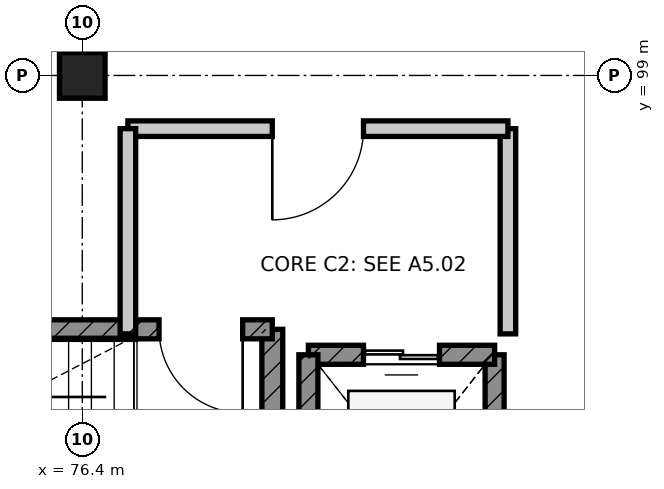
"""IFC4 building model, lengths in metres.
Left out: names, types, materials, properties, quantities, classifications, styles, units other than length and angle.
Written with IfcOpenShell. Run it as: python <this file> out.ifc"""

import sys

from ifc_helpers import new_model, si_unit, direction, frame, frame_2d, origin, origin_2d, place, context, subcontext, project, spatial, rectangle, extrude, element, fill, save


model = new_model("IFC4")
c1 = context("Model", 3, precision=1e-05, world=origin(), true_north=direction((0.0, 1.0)))
c2 = subcontext(c1, "Body", "Model", "MODEL_VIEW")
j1 = project(units=[si_unit("LENGTHUNIT", "METRE"), si_unit("PLANEANGLEUNIT", "RADIAN")], contexts=[c1])
p1 = place(None, origin())
s1 = spatial("IfcSite", under=j1, at=p1, CompositionType="ELEMENT")
p2 = place(p1, origin())
s2 = spatial("IfcBuilding", under=s1, at=p2, CompositionType="ELEMENT")
p3 = place(p2, frame((0.0, 0.0, 33.6)))
s3 = spatial("IfcBuildingStorey", under=s2, at=p3, CompositionType="ELEMENT", Elevation=33.6)
p4 = place(p3, frame((76.4, 99.0, 0.0), z_axis=(0.0, 0.0, 1.0), x_axis=(1.0, 0.0, 0.0)))
e1 = element("IfcColumn", 1, at=p4, inside=s3, PredefinedType="COLUMN", context=c2, shape_type="SweptSolid", body=[
    extrude(rectangle(XDim=0.6, YDim=0.6, at=origin_2d()), origin(), (0.0, 0.0, 1.0), 3.6),
])
p5 = place(p3, frame((78.9, 92.1, 0.0), z_axis=(0.0, 0.0, 1.0), x_axis=(0.0, 1.0, 0.0)))
e2 = element("IfcWall", 2, at=p5, inside=s3, PredefinedType="SHEAR", context=c2, shape_type="SweptSolid", body=[
    extrude(rectangle(XDim=3.56, YDim=0.275, at=frame_2d((1.78, 0.0))), origin(), (0.0, 0.0, 1.0), 3.36),
])
p6 = place(p3, frame((78.9, 95.66, 0.0), z_axis=(0.0, 0.0, 1.0), x_axis=(-1.0, 0.0, 0.0)))
e3 = element("IfcWall", 3, at=p6, inside=s3, PredefinedType="SHEAR", context=c2, shape_type="SweptSolid", body=[
    extrude(rectangle(XDim=8.4, YDim=0.25, at=frame_2d((4.2, 0.0))), origin(), (0.0, 0.0, 1.0), 3.36),
])
p7 = place(p6, frame((0.39, 0.0, 0.0)))
e4 = element("IfcOpeningElement", 4, at=p7, cuts=e3, PredefinedType="OPENING", context=c2, shape_type="SweptSolid", body=[
    extrude(rectangle(XDim=1.1, YDim=2.1, at=frame_2d((0.55, 1.05))), frame((0.0, 0.135, 0.0), z_axis=(0.0, -1.0, 0.0), x_axis=(1.0, 0.0, 0.0)), (0.0, 0.0, 1.0), 0.27),
])
p8 = place(p3, frame((81.825, 92.275, 0.0), z_axis=(0.0, 0.0, 1.0), x_axis=(0.0, 1.0, 0.0)))
e5 = element("IfcWall", 5, at=p8, inside=s3, PredefinedType="SHEAR", context=c2, shape_type="SweptSolid", body=[
    extrude(rectangle(XDim=3.05, YDim=0.25, at=frame_2d((1.525, 0.0))), origin(), (0.0, 0.0, 1.0), 3.36),
])
p9 = place(p3, frame((81.825, 95.325, 0.0), z_axis=(0.0, 0.0, 1.0), x_axis=(-1.0, 0.0, 0.0)))
e6 = element("IfcWall", 6, at=p9, inside=s3, PredefinedType="SHEAR", context=c2, shape_type="SweptSolid", body=[
    extrude(rectangle(XDim=2.45, YDim=0.25, at=frame_2d((1.225, 0.0))), origin(), (0.0, 0.0, 1.0), 3.36),
])
p10 = place(p9, frame((0.725, 0.0, 0.0)))
e7 = element("IfcOpeningElement", 7, at=p10, cuts=e6, PredefinedType="OPENING", context=c2, shape_type="SweptSolid", body=[
    extrude(rectangle(XDim=1.0, YDim=2.15, at=frame_2d((0.5, 1.075))), frame((0.0, 0.135, 0.0), z_axis=(0.0, -1.0, 0.0), x_axis=(1.0, 0.0, 0.0)), (0.0, 0.0, 1.0), 0.27),
])
p11 = place(p3, frame((79.375, 95.325, 0.0), z_axis=(0.0, 0.0, 1.0), x_axis=(0.0, -1.0, 0.0)))
e8 = element("IfcWall", 8, at=p11, inside=s3, PredefinedType="SHEAR", context=c2, shape_type="SweptSolid", body=[
    extrude(rectangle(XDim=3.05, YDim=0.25, at=frame_2d((1.525, 0.0))), origin(), (0.0, 0.0, 1.0), 3.36),
])
p12 = place(p3, frame((82.0, 95.6, 0.0), z_axis=(0.0, 0.0, 1.0), x_axis=(0.0, 1.0, 0.0)))
e9 = element("IfcWall", 9, at=p12, inside=s3, PredefinedType="PARTITIONING", context=c2, shape_type="SweptSolid", body=[
    extrude(rectangle(XDim=2.7, YDim=0.205, at=frame_2d((1.35, 0.0))), origin(), (0.0, 0.0, 1.0), 3.36),
])
p13 = place(p3, frame((82.0, 98.3, 0.0), z_axis=(0.0, 0.0, 1.0), x_axis=(-1.0, 0.0, 0.0)))
e10 = element("IfcWall", 10, at=p13, inside=s3, PredefinedType="PARTITIONING", context=c2, shape_type="SweptSolid", body=[
    extrude(rectangle(XDim=5.0, YDim=0.205, at=frame_2d((2.5, 0.0))), origin(), (0.0, 0.0, 1.0), 3.36),
])
p14 = place(p13, frame((1.9, 0.0, 0.0)))
e11 = element("IfcOpeningElement", 11, at=p14, cuts=e10, PredefinedType="OPENING", context=c2, shape_type="SweptSolid", body=[
    extrude(rectangle(XDim=1.2, YDim=2.1, at=frame_2d((0.6, 1.05))), frame((0.0, 0.113, 0.0), z_axis=(0.0, -1.0, 0.0), x_axis=(1.0, 0.0, 0.0)), (0.0, 0.0, 1.0), 0.225),
])
p15 = place(p3, frame((77.0, 98.3, 0.0), z_axis=(0.0, 0.0, 1.0), x_axis=(0.0, -1.0, 0.0)))
e12 = element("IfcWall", 12, at=p15, inside=s3, PredefinedType="PARTITIONING", context=c2, shape_type="SweptSolid", body=[
    extrude(rectangle(XDim=2.7, YDim=0.205, at=frame_2d((1.35, 0.0))), origin(), (0.0, 0.0, 1.0), 3.36),
])
p16 = place(p7, origin())
e13 = element("IfcDoor", 13, at=p16, inside=s3, OperationType="SINGLE_SWING_LEFT", PredefinedType="DOOR", context=c2, shape_type="SweptSolid", body=[
    extrude(rectangle(XDim=1.1, YDim=2.1, at=frame_2d((0.55, 1.05))), frame((0.0, 0.025, 0.0), z_axis=(0.0, -1.0, 0.0), x_axis=(1.0, 0.0, 0.0)), (0.0, 0.0, 1.0), 0.05),
])
fill(e4, e13)
p17 = place(p10, origin())
e14 = element("IfcDoor", 14, at=p17, inside=s3, OperationType="DOUBLE_DOOR_SLIDING", PredefinedType="DOOR", context=c2, shape_type="SweptSolid", body=[
    extrude(rectangle(XDim=1.0, YDim=2.15, at=frame_2d((0.5, 1.075))), frame((0.0, 0.025, 0.0), z_axis=(0.0, -1.0, 0.0), x_axis=(1.0, 0.0, 0.0)), (0.0, 0.0, 1.0), 0.05),
])
fill(e7, e14)
p18 = place(p14, origin())
e15 = element("IfcDoor", 15, at=p18, inside=s3, OperationType="SINGLE_SWING_RIGHT", PredefinedType="DOOR", context=c2, shape_type="SweptSolid", body=[
    extrude(rectangle(XDim=1.2, YDim=2.1, at=frame_2d((0.6, 1.05))), frame((0.0, 0.025, 0.0), z_axis=(0.0, -1.0, 0.0), x_axis=(1.0, 0.0, 0.0)), (0.0, 0.0, 1.0), 0.05),
])
fill(e11, e15)
save(model, sys.argv[1])
